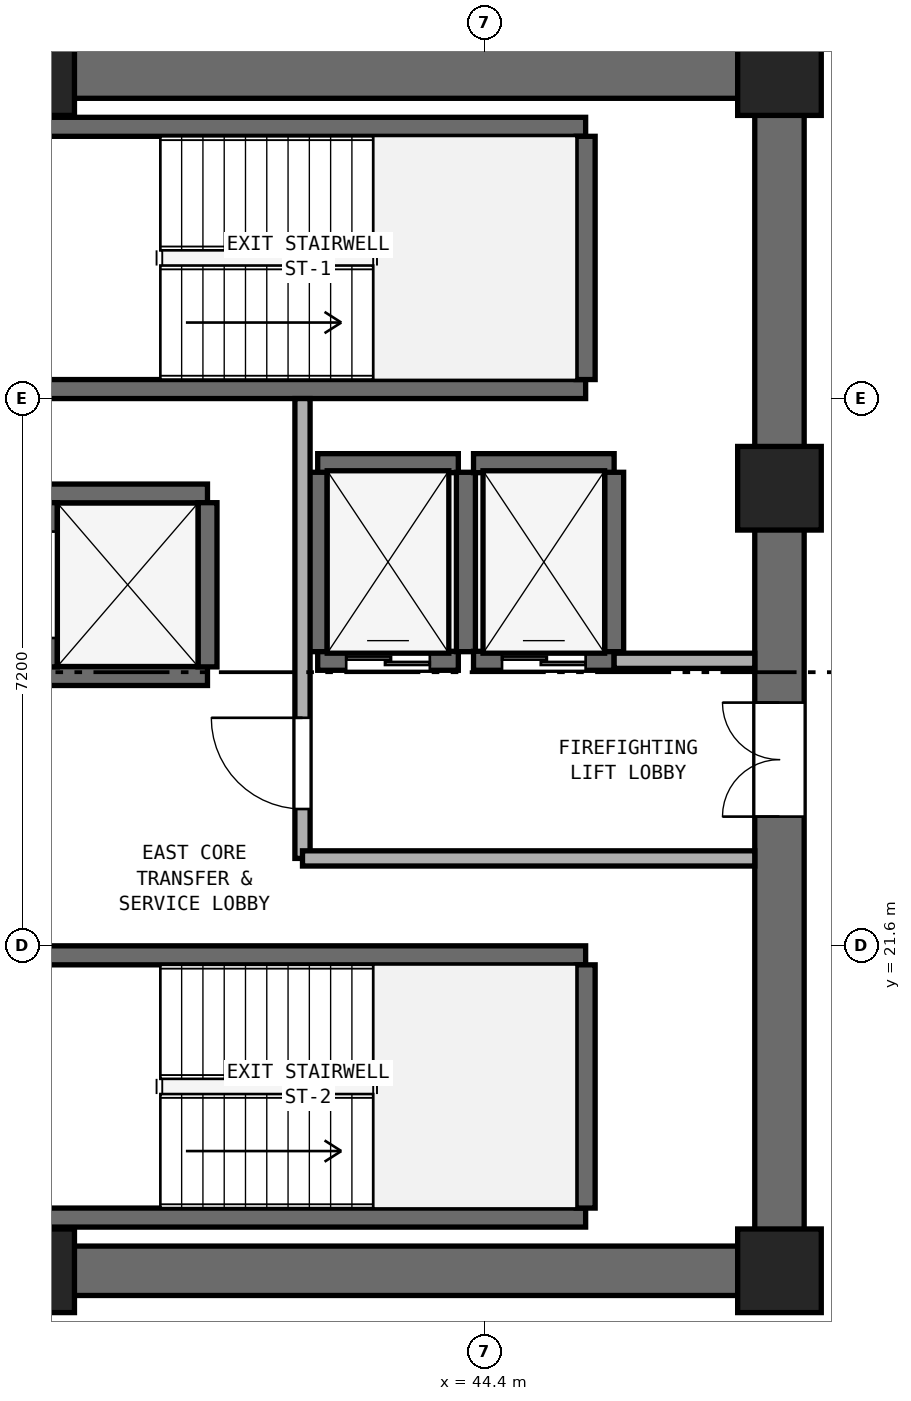
"""IFC4 building model, lengths in metres.
Left out: names, types, materials, properties, quantities, classifications, styles, units other than length and angle.
Written with IfcOpenShell. Run it as: python <this file> out.ifc"""

import sys

from ifc_helpers import new_model, si_unit, direction, frame, frame_2d, origin, origin_2d, place, context, subcontext, project, spatial, rectangle, extrude, element, fill, save


model = new_model("IFC4")
c1 = context("Model", 3, precision=1e-05, world=origin(), true_north=direction((0.0, 1.0)))
c2 = subcontext(c1, "Body", "Model", "MODEL_VIEW")
j1 = project(units=[si_unit("LENGTHUNIT", "METRE"), si_unit("PLANEANGLEUNIT", "RADIAN")], contexts=[c1])
p1 = place(None, origin())
s1 = spatial("IfcSite", under=j1, at=p1, CompositionType="ELEMENT")
p2 = place(p1, origin())
s2 = spatial("IfcBuilding", under=s1, at=p2, CompositionType="ELEMENT")
p3 = place(p2, frame((0.0, 0.0, 59.2)))
s3 = spatial("IfcBuildingStorey", under=s2, at=p3, CompositionType="ELEMENT", Elevation=59.2)
for number, where, z_axis, x_axis in (
    (1, (25.4, 17.325, 0.0), (0.0, 0.0, 1.0), (1.0, 0.0, 0.0)),
    (2, (25.4, 33.075, 0.0), (0.0, 0.0, 1.0), (1.0, 0.0, 0.0)),
):
    element("IfcWall", number, at=place(p3, frame(where, z_axis=z_axis, x_axis=x_axis)), inside=s3, PredefinedType="SHEAR", context=c2, shape_type="SweptSolid", body=[
        extrude(rectangle(XDim=23.2, YDim=0.65, at=frame_2d((11.6, 0.0))), origin(), (0.0, 0.0, 1.0), 3.525),
    ])
p4 = place(p3, frame((48.275, 17.65, 0.0), z_axis=(0.0, 0.0, 1.0), x_axis=(0.0, 1.0, 0.0)))
e3 = element("IfcWall", 3, at=p4, inside=s3, PredefinedType="SHEAR", context=c2, shape_type="SweptSolid", body=[
    extrude(rectangle(XDim=15.1, YDim=0.65, at=frame_2d((7.55, 0.0))), origin(), (0.0, 0.0, 1.0), 3.525),
])
p5 = place(p4, frame((5.65, 0.0, 0.0)))
e4 = element("IfcOpeningElement", 4, at=p5, cuts=e3, PredefinedType="OPENING", context=c2, shape_type="SweptSolid", body=[
    extrude(rectangle(XDim=1.5, YDim=2.15, at=frame_2d((0.75, 1.075))), frame((0.0, 0.335, 0.0), z_axis=(0.0, -1.0, 0.0), x_axis=(1.0, 0.0, 0.0)), (0.0, 0.0, 1.0), 0.67),
])
for number, where, z_axis, x_axis in (
    (5, (38.45, 17.325, 0.0), (0.0, 0.0, 1.0), (1.0, 0.0, 0.0)),
    (6, (48.275, 17.325, 0.0), (0.0, 0.0, 1.0), (1.0, 0.0, 0.0)),
    (7, (48.275, 27.62, 0.0), (0.0, 0.0, 1.0), (1.0, 0.0, 0.0)),
    (8, (48.275, 33.075, 0.0), (0.0, 0.0, 1.0), (1.0, 0.0, 0.0)),
    (9, (38.45, 33.075, 0.0), (0.0, 0.0, 1.0), (1.0, 0.0, 0.0)),
):
    element("IfcColumn", number, at=place(p3, frame(where, z_axis=z_axis, x_axis=x_axis)), inside=s3, PredefinedType="PILASTER", context=c2, shape_type="SweptSolid", body=[
        extrude(rectangle(XDim=1.1, YDim=1.1, at=origin_2d()), origin(), (0.0, 0.0, 1.0), 3.8),
    ])
for number, where, z_axis, x_axis in (
    (10, (38.425, 28.925, 0.0), (0.0, 0.0, 1.0), (1.0, 0.0, 0.0)),
    (11, (38.425, 32.375, 0.0), (0.0, 0.0, 1.0), (1.0, 0.0, 0.0)),
):
    element("IfcWall", number, at=place(p3, frame(where, z_axis=z_axis, x_axis=x_axis)), inside=s3, PredefinedType="SHEAR", context=c2, shape_type="SweptSolid", body=[
        extrude(rectangle(XDim=7.3, YDim=0.25, at=frame_2d((3.65, 0.0))), origin(), (0.0, 0.0, 1.0), 3.525),
    ])
p6 = place(p3, frame((45.725, 29.05, 0.0), z_axis=(0.0, 0.0, 1.0), x_axis=(0.0, 1.0, 0.0)))
e12 = element("IfcWall", 12, at=p6, inside=s3, PredefinedType="SHEAR", context=c2, shape_type="SweptSolid", body=[
    extrude(rectangle(XDim=3.2, YDim=0.25, at=frame_2d((1.6, 0.0))), origin(), (0.0, 0.0, 1.0), 3.525),
])
for number, where, z_axis, x_axis in (
    (13, (38.425, 18.025, 0.0), (0.0, 0.0, 1.0), (1.0, 0.0, 0.0)),
    (14, (38.425, 21.475, 0.0), (0.0, 0.0, 1.0), (1.0, 0.0, 0.0)),
):
    element("IfcWall", number, at=place(p3, frame(where, z_axis=z_axis, x_axis=x_axis)), inside=s3, PredefinedType="SHEAR", context=c2, shape_type="SweptSolid", body=[
        extrude(rectangle(XDim=7.3, YDim=0.25, at=frame_2d((3.65, 0.0))), origin(), (0.0, 0.0, 1.0), 3.525),
    ])
p7 = place(p3, frame((45.725, 18.15, 0.0), z_axis=(0.0, 0.0, 1.0), x_axis=(0.0, 1.0, 0.0)))
e15 = element("IfcWall", 15, at=p7, inside=s3, PredefinedType="SHEAR", context=c2, shape_type="SweptSolid", body=[
    extrude(rectangle(XDim=3.2, YDim=0.25, at=frame_2d((1.6, 0.0))), origin(), (0.0, 0.0, 1.0), 3.525),
])
p8 = place(p3, frame((42.2, 25.35, 0.0), z_axis=(0.0, 0.0, 1.0), x_axis=(1.0, 0.0, 0.0)))
e16 = element("IfcWall", 16, at=p8, inside=s3, PredefinedType="SHEAR", context=c2, shape_type="SweptSolid", body=[
    extrude(rectangle(XDim=1.85, YDim=0.25, at=frame_2d((0.925, 0.0))), origin(), (0.0, 0.0, 1.0), 3.525),
])
p9 = place(p8, frame((0.375, 0.0, 0.0)))
e17 = element("IfcOpeningElement", 17, at=p9, cuts=e16, PredefinedType="OPENING", context=c2, shape_type="SweptSolid", body=[
    extrude(rectangle(XDim=1.1, YDim=2.15, at=frame_2d((0.55, 1.075))), frame((0.0, 0.135, 0.0), z_axis=(0.0, -1.0, 0.0), x_axis=(1.0, 0.0, 0.0)), (0.0, 0.0, 1.0), 0.27),
])
p10 = place(p3, frame((42.2, 27.95, 0.0), z_axis=(0.0, 0.0, 1.0), x_axis=(1.0, 0.0, 0.0)))
e18 = element("IfcWall", 18, at=p10, inside=s3, PredefinedType="SHEAR", context=c2, shape_type="SweptSolid", body=[
    extrude(rectangle(XDim=1.85, YDim=0.25, at=frame_2d((0.925, 0.0))), origin(), (0.0, 0.0, 1.0), 3.525),
])
for number, where, z_axis, x_axis in (
    (19, (42.2, 25.47, 0.0), (0.0, 0.0, 1.0), (0.0, 1.0, 0.0)),
    (20, (44.15, 25.47, 0.0), (0.0, 0.0, 1.0), (0.0, 1.0, 0.0)),
):
    element("IfcWall", number, at=place(p3, frame(where, z_axis=z_axis, x_axis=x_axis)), inside=s3, PredefinedType="SHEAR", context=c2, shape_type="SweptSolid", body=[
        extrude(rectangle(XDim=2.36, YDim=0.25, at=frame_2d((1.18, 0.0))), origin(), (0.0, 0.0, 1.0), 3.525),
    ])
p11 = place(p3, frame((44.25, 25.35, 0.0), z_axis=(0.0, 0.0, 1.0), x_axis=(1.0, 0.0, 0.0)))
e21 = element("IfcWall", 21, at=p11, inside=s3, PredefinedType="SHEAR", context=c2, shape_type="SweptSolid", body=[
    extrude(rectangle(XDim=1.85, YDim=0.25, at=frame_2d((0.925, 0.0))), origin(), (0.0, 0.0, 1.0), 3.525),
])
p12 = place(p11, frame((0.375, 0.0, 0.0)))
e22 = element("IfcOpeningElement", 22, at=p12, cuts=e21, PredefinedType="OPENING", context=c2, shape_type="SweptSolid", body=[
    extrude(rectangle(XDim=1.1, YDim=2.15, at=frame_2d((0.55, 1.075))), frame((0.0, 0.135, 0.0), z_axis=(0.0, -1.0, 0.0), x_axis=(1.0, 0.0, 0.0)), (0.0, 0.0, 1.0), 0.27),
])
p13 = place(p3, frame((44.25, 27.95, 0.0), z_axis=(0.0, 0.0, 1.0), x_axis=(1.0, 0.0, 0.0)))
e23 = element("IfcWall", 23, at=p13, inside=s3, PredefinedType="SHEAR", context=c2, shape_type="SweptSolid", body=[
    extrude(rectangle(XDim=1.85, YDim=0.25, at=frame_2d((0.925, 0.0))), origin(), (0.0, 0.0, 1.0), 3.525),
])
p14 = place(p3, frame((46.1, 25.47, 0.0), z_axis=(0.0, 0.0, 1.0), x_axis=(0.0, 1.0, 0.0)))
e24 = element("IfcWall", 24, at=p14, inside=s3, PredefinedType="SHEAR", context=c2, shape_type="SweptSolid", body=[
    extrude(rectangle(XDim=2.36, YDim=0.25, at=frame_2d((1.18, 0.0))), origin(), (0.0, 0.0, 1.0), 3.525),
])
for number, where, z_axis, x_axis in (
    (25, (38.65, 25.15, 0.0), (0.0, 0.0, 1.0), (1.0, 0.0, 0.0)),
    (26, (38.65, 27.55, 0.0), (0.0, 0.0, 1.0), (1.0, 0.0, 0.0)),
):
    element("IfcWall", number, at=place(p3, frame(where, z_axis=z_axis, x_axis=x_axis)), inside=s3, PredefinedType="SHEAR", context=c2, shape_type="SweptSolid", body=[
        extrude(rectangle(XDim=2.1, YDim=0.25, at=frame_2d((1.05, 0.0))), origin(), (0.0, 0.0, 1.0), 3.525),
    ])
p15 = place(p3, frame((38.65, 25.27, 0.0), z_axis=(0.0, 0.0, 1.0), x_axis=(0.0, 1.0, 0.0)))
e27 = element("IfcWall", 27, at=p15, inside=s3, PredefinedType="SHEAR", context=c2, shape_type="SweptSolid", body=[
    extrude(rectangle(XDim=2.16, YDim=0.25, at=frame_2d((1.08, 0.0))), origin(), (0.0, 0.0, 1.0), 3.525),
])
p16 = place(p15, frame((0.38, 0.0, 0.0)))
e28 = element("IfcOpeningElement", 28, at=p16, cuts=e27, PredefinedType="OPENING", context=c2, shape_type="SweptSolid", body=[
    extrude(rectangle(XDim=1.4, YDim=2.2, at=frame_2d((0.7, 1.1))), frame((0.0, 0.135, 0.0), z_axis=(0.0, -1.0, 0.0), x_axis=(1.0, 0.0, 0.0)), (0.0, 0.0, 1.0), 0.27),
])
p17 = place(p3, frame((40.75, 25.27, 0.0), z_axis=(0.0, 0.0, 1.0), x_axis=(0.0, 1.0, 0.0)))
e29 = element("IfcWall", 29, at=p17, inside=s3, PredefinedType="SHEAR", context=c2, shape_type="SweptSolid", body=[
    extrude(rectangle(XDim=2.16, YDim=0.25, at=frame_2d((1.08, 0.0))), origin(), (0.0, 0.0, 1.0), 3.525),
])
p18 = place(p3, frame((42.0, 22.75, 0.0), z_axis=(0.0, 0.0, 1.0), x_axis=(0.0, 1.0, 0.0)))
e30 = element("IfcWall", 30, at=p18, inside=s3, PredefinedType="SOLIDWALL", context=c2, shape_type="SweptSolid", body=[
    extrude(rectangle(XDim=6.05, YDim=0.2, at=frame_2d((3.025, 0.0))), origin(), (0.0, 0.0, 1.0), 3.525),
])
p19 = place(p18, frame((0.65, 0.0, 0.0)))
e31 = element("IfcOpeningElement", 31, at=p19, cuts=e30, PredefinedType="OPENING", context=c2, shape_type="SweptSolid", body=[
    extrude(rectangle(XDim=1.2, YDim=2.15, at=frame_2d((0.6, 1.075))), frame((0.0, 0.11, 0.0), z_axis=(0.0, -1.0, 0.0), x_axis=(1.0, 0.0, 0.0)), (0.0, 0.0, 1.0), 0.22),
])
p20 = place(p3, frame((42.0, 22.75, 0.0), z_axis=(0.0, 0.0, 1.0), x_axis=(1.0, 0.0, 0.0)))
e32 = element("IfcWall", 32, at=p20, inside=s3, PredefinedType="SOLIDWALL", context=c2, shape_type="SweptSolid", body=[
    extrude(rectangle(XDim=5.95, YDim=0.2, at=frame_2d((2.975, 0.0))), origin(), (0.0, 0.0, 1.0), 3.525),
])
p21 = place(p3, frame((46.1, 25.35, 0.0), z_axis=(0.0, 0.0, 1.0), x_axis=(1.0, 0.0, 0.0)))
e33 = element("IfcWall", 33, at=p21, inside=s3, PredefinedType="SOLIDWALL", context=c2, shape_type="SweptSolid", body=[
    extrude(rectangle(XDim=1.85, YDim=0.2, at=frame_2d((0.925, 0.0))), origin(), (0.0, 0.0, 1.0), 3.525),
])
p22 = place(p9, origin())
e34 = element("IfcDoor", 34, at=p22, inside=s3, OperationType="DOUBLE_DOOR_SLIDING", PredefinedType="DOOR", context=c2, shape_type="SweptSolid", body=[
    extrude(rectangle(XDim=1.1, YDim=2.15, at=frame_2d((0.55, 1.075))), frame((0.0, 0.025, 0.0), z_axis=(0.0, -1.0, 0.0), x_axis=(1.0, 0.0, 0.0)), (0.0, 0.0, 1.0), 0.05),
])
fill(e17, e34)
p23 = place(p12, origin())
e35 = element("IfcDoor", 35, at=p23, inside=s3, OperationType="DOUBLE_DOOR_SLIDING", PredefinedType="DOOR", context=c2, shape_type="SweptSolid", body=[
    extrude(rectangle(XDim=1.1, YDim=2.15, at=frame_2d((0.55, 1.075))), frame((0.0, 0.025, 0.0), z_axis=(0.0, -1.0, 0.0), x_axis=(1.0, 0.0, 0.0)), (0.0, 0.0, 1.0), 0.05),
])
fill(e22, e35)
p24 = place(p19, origin())
e36 = element("IfcDoor", 36, at=p24, inside=s3, OperationType="SINGLE_SWING_RIGHT", PredefinedType="DOOR", context=c2, shape_type="SweptSolid", body=[
    extrude(rectangle(XDim=1.2, YDim=2.15, at=frame_2d((0.6, 1.075))), frame((0.0, 0.025, 0.0), z_axis=(0.0, -1.0, 0.0), x_axis=(1.0, 0.0, 0.0)), (0.0, 0.0, 1.0), 0.05),
])
fill(e31, e36)
p25 = place(p5, origin())
e37 = element("IfcDoor", 37, at=p25, inside=s3, OperationType="DOUBLE_DOOR_SINGLE_SWING", PredefinedType="DOOR", context=c2, shape_type="SweptSolid", body=[
    extrude(rectangle(XDim=1.5, YDim=2.15, at=frame_2d((0.75, 1.075))), frame((0.0, 0.025, 0.0), z_axis=(0.0, -1.0, 0.0), x_axis=(1.0, 0.0, 0.0)), (0.0, 0.0, 1.0), 0.05),
])
fill(e4, e37)
save(model, sys.argv[1])
